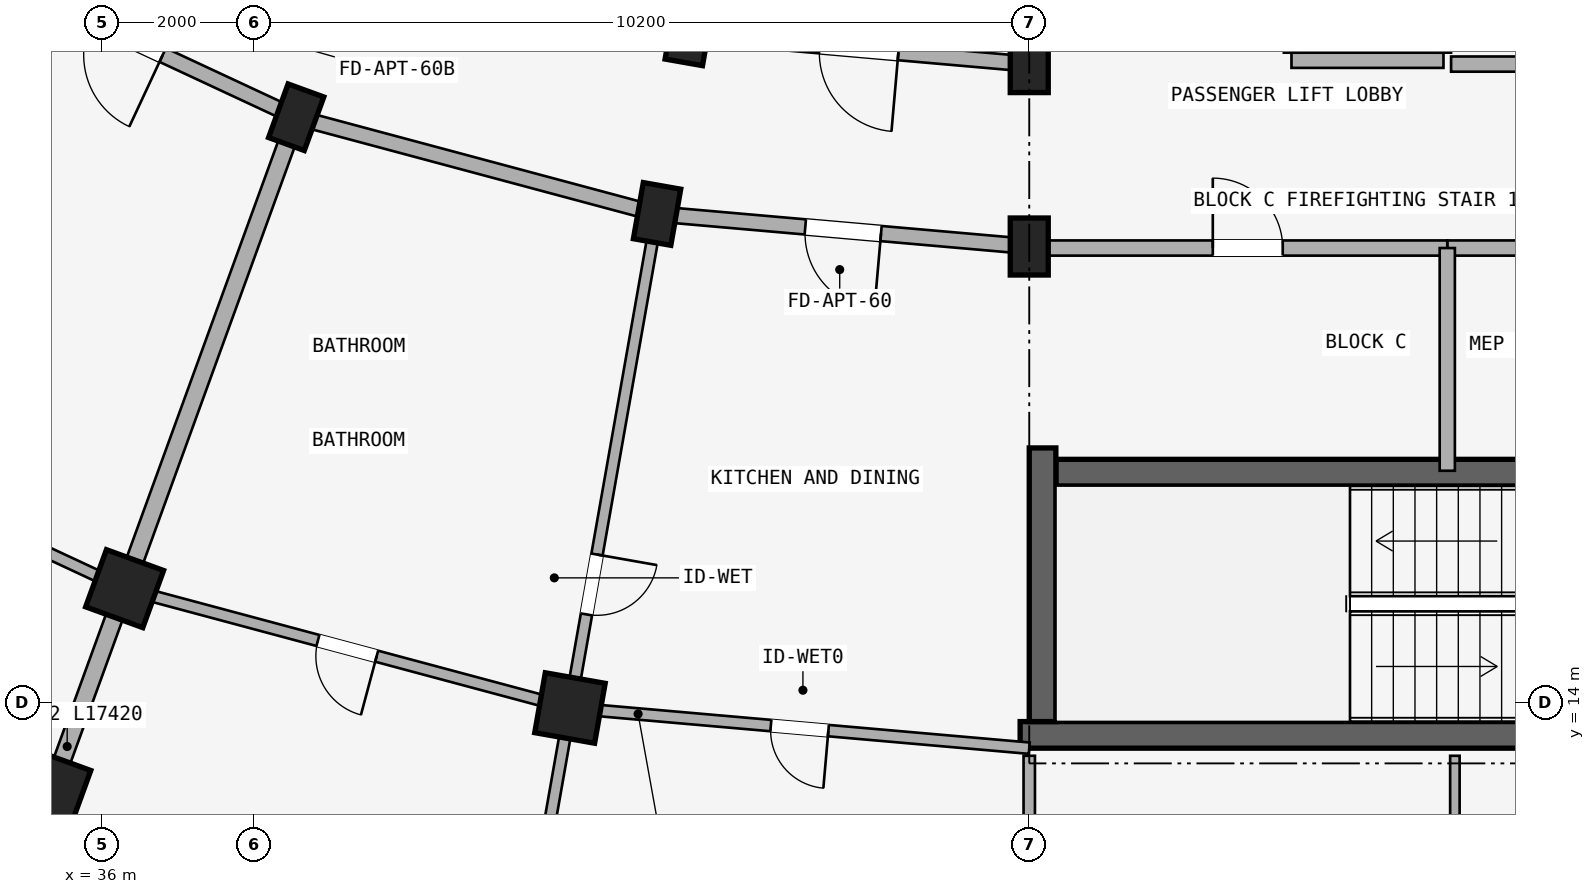
"""IFC4 building model, lengths in metres.
Left out: names, types, materials, properties, quantities, classifications, styles, units other than length and angle.
Written with IfcOpenShell. Run it as: python <this file> out.ifc"""

import sys

from ifc_helpers import new_model, si_unit, direction, frame, frame_2d, origin, origin_2d, place, context, subcontext, project, spatial, rectangle, extrude, element, fill, save


model = new_model("IFC4")
c1 = context("Model", 3, precision=1e-05, world=origin(), true_north=direction((0.0, 1.0)))
c2 = subcontext(c1, "Body", "Model", "MODEL_VIEW")
j1 = project(units=[si_unit("LENGTHUNIT", "METRE"), si_unit("PLANEANGLEUNIT", "RADIAN")], contexts=[c1])
p1 = place(None, origin())
s1 = spatial("IfcSite", under=j1, at=p1, CompositionType="ELEMENT")
p2 = place(p1, origin())
s2 = spatial("IfcBuilding", under=s1, at=p2, CompositionType="ELEMENT")
p3 = place(p2, frame((0.0, 0.0, 8.7)))
s3 = spatial("IfcBuildingStorey", under=s2, at=p3, CompositionType="ELEMENT", Elevation=8.7)
p4 = place(p3, frame((48.08, 13.575, 0.0), z_axis=(0.0, 0.0, 1.0), x_axis=(1.0, 0.0, 0.0)))
e1 = element("IfcWall", 1, at=p4, inside=s3, PredefinedType="SHEAR", context=c2, shape_type="SweptSolid", body=[
    extrude(rectangle(XDim=8.545, YDim=0.35, at=frame_2d((4.272, 0.0))), origin(), (0.0, 0.0, 1.0), 2.93),
])
p5 = place(p3, frame((48.55, 17.025, 0.0), z_axis=(0.0, 0.0, 1.0), x_axis=(1.0, 0.0, 0.0)))
e2 = element("IfcWall", 2, at=p5, inside=s3, PredefinedType="SHEAR", context=c2, shape_type="SweptSolid", body=[
    extrude(rectangle(XDim=8.075, YDim=0.35, at=frame_2d((4.038, 0.0))), origin(), (0.0, 0.0, 1.0), 2.93),
])
p6 = place(p5, frame((6.38, 0.0, 0.0)))
e3 = element("IfcOpeningElement", 3, at=p6, cuts=e2, PredefinedType="OPENING", context=c2, shape_type="SweptSolid", body=[
    extrude(rectangle(XDim=1.24, YDim=2.15, at=frame_2d((0.62, 1.075))), frame((0.0, 0.185, 0.0), z_axis=(0.0, -1.0, 0.0), x_axis=(1.0, 0.0, 0.0)), (0.0, 0.0, 1.0), 0.37),
])
p7 = place(p3, frame((48.375, 17.35, 0.0), z_axis=(0.0, 0.0, 1.0), x_axis=(0.0, -1.0, 0.0)))
e4 = element("IfcWall", 4, at=p7, inside=s3, PredefinedType="SHEAR", context=c2, shape_type="SweptSolid", body=[
    extrude(rectangle(XDim=3.6, YDim=0.35, at=frame_2d((1.8, 0.0))), origin(), (0.0, 0.0, 1.0), 2.93),
])
for number, where, z_axis, x_axis in (
    (5, (48.2, 22.4, 0.0), (0.0, 0.0, 1.0), (1.0, 0.0, 0.0)),
    (6, (48.2, 20.0, 0.0), (0.0, 0.0, 1.0), (1.0, 0.0, 0.0)),
    (7, (43.72, 22.792, 0.0), (0.0, 0.0, 1.0), (-0.985, 0.174, 0.0)),
    (8, (43.303, 20.428, 0.0), (0.0, 0.0, 1.0), (-0.985, 0.174, 0.0)),
):
    element("IfcColumn", number, at=place(p3, frame(where, z_axis=z_axis, x_axis=x_axis)), inside=s3, PredefinedType="COLUMN", context=c2, shape_type="SweptSolid", body=[
        extrude(rectangle(XDim=0.5, YDim=0.75, at=origin_2d()), origin(), (0.0, 0.0, 1.0), 2.93),
    ])
p8 = place(p3, frame((42.157, 13.929, 0.0), z_axis=(0.0, 0.0, 1.0), x_axis=(-0.984807753012, 0.173648177667, 0.0)))
e9 = element("IfcColumn", 9, at=p8, inside=s3, PredefinedType="COLUMN", context=c2, shape_type="SweptSolid", body=[
    extrude(rectangle(XDim=0.8, YDim=0.8, at=origin_2d()), origin(), (0.0, 0.0, 1.0), 2.93),
])
p9 = place(p3, frame((38.555, 21.701, 0.0), z_axis=(0.0, 0.0, 1.0), x_axis=(-0.939692620786, 0.342020143326, 0.0)))
e10 = element("IfcColumn", 10, at=p9, inside=s3, PredefinedType="COLUMN", context=c2, shape_type="SweptSolid", body=[
    extrude(rectangle(XDim=0.5, YDim=0.75, at=origin_2d()), origin(), (0.0, 0.0, 1.0), 2.93),
])
for number, where, z_axis, x_axis in (
    (11, (36.298, 15.499, 0.0), (0.0, 0.0, 1.0), (-0.94, 0.342, 0.0)),
    (12, (35.34, 12.868, 0.0), (0.0, 0.0, 1.0), (-0.94, 0.342, 0.0)),
):
    element("IfcColumn", number, at=place(p3, frame(where, z_axis=z_axis, x_axis=x_axis)), inside=s3, PredefinedType="COLUMN", context=c2, shape_type="SweptSolid", body=[
        extrude(rectangle(XDim=0.8, YDim=0.8, at=origin_2d()), origin(), (0.0, 0.0, 1.0), 2.93),
    ])
p10 = place(p3, frame((53.7, 19.98, 0.0), z_axis=(0.0, 0.0, 1.0), x_axis=(1.0, 0.0, 0.0)))
e13 = element("IfcWall", 13, at=p10, inside=s3, PredefinedType="STANDARD", context=c2, shape_type="SweptSolid", body=[
    extrude(rectangle(XDim=5.65, YDim=0.2, at=frame_2d((2.825, 0.0))), origin(), (0.0, 0.0, 1.0), 2.372),
])
p11 = place(p10, frame((1.923, 0.0, 0.0)))
e14 = element("IfcOpeningElement", 14, at=p11, cuts=e13, PredefinedType="OPENING", context=c2, shape_type="SweptSolid", body=[
    extrude(rectangle(XDim=1.24, YDim=2.15, at=frame_2d((0.62, 1.075))), frame((0.0, 0.11, 0.0), z_axis=(0.0, -1.0, 0.0), x_axis=(1.0, 0.0, 0.0)), (0.0, 0.0, 1.0), 0.22),
])
p12 = place(p3, frame((48.45, 19.98, 0.0), z_axis=(0.0, 0.0, 1.0), x_axis=(1.0, 0.0, 0.0)))
e15 = element("IfcWall", 15, at=p12, inside=s3, PredefinedType="STANDARD", context=c2, shape_type="SweptSolid", body=[
    extrude(rectangle(XDim=5.25, YDim=0.2, at=frame_2d((2.625, 0.0))), origin(), (0.0, 0.0, 1.0), 2.372),
])
p13 = place(p12, frame((2.165, 0.0, 0.0)))
e16 = element("IfcOpeningElement", 16, at=p13, cuts=e15, PredefinedType="OPENING", context=c2, shape_type="SweptSolid", body=[
    extrude(rectangle(XDim=0.92, YDim=2.1, at=frame_2d((0.46, 1.05))), frame((0.0, 0.11, 0.0), z_axis=(0.0, -1.0, 0.0), x_axis=(1.0, 0.0, 0.0)), (0.0, 0.0, 1.0), 0.22),
])
p14 = place(p3, frame((53.7, 19.98, 0.0), z_axis=(0.0, 0.0, 1.0), x_axis=(0.0, -1.0, 0.0)))
e17 = element("IfcWall", 17, at=p14, inside=s3, PredefinedType="STANDARD", context=c2, shape_type="SweptSolid", body=[
    extrude(rectangle(XDim=2.93, YDim=0.2, at=frame_2d((1.465, 0.0))), origin(), (0.0, 0.0, 1.0), 2.372),
])
p15 = place(p3, frame((51.65, 22.45, 0.0), z_axis=(0.0, 0.0, 1.0), x_axis=(1.0, 0.0, 0.0)))
e18 = element("IfcWall", 18, at=p15, inside=s3, PredefinedType="STANDARD", context=c2, shape_type="SweptSolid", body=[
    extrude(rectangle(XDim=2.0, YDim=0.2, at=frame_2d((1.0, 0.0))), origin(), (0.0, 0.0, 1.0), 2.372),
])
p16 = place(p3, frame((51.65, 25.15, 0.0), z_axis=(0.0, 0.0, 1.0), x_axis=(0.0, -1.0, 0.0)))
e19 = element("IfcWall", 19, at=p16, inside=s3, PredefinedType="STANDARD", context=c2, shape_type="SweptSolid", body=[
    extrude(rectangle(XDim=2.6, YDim=0.2, at=frame_2d((1.3, 0.0))), origin(), (0.0, 0.0, 1.0), 2.372),
])
p17 = place(p3, frame((53.65, 25.15, 0.0), z_axis=(0.0, 0.0, 1.0), x_axis=(0.0, -1.0, 0.0)))
e20 = element("IfcWall", 20, at=p17, inside=s3, PredefinedType="STANDARD", context=c2, shape_type="SweptSolid", body=[
    extrude(rectangle(XDim=2.6, YDim=0.2, at=frame_2d((1.3, 0.0))), origin(), (0.0, 0.0, 1.0), 2.372),
])
p18 = place(p17, frame((0.79, 0.0, 0.0)))
e21 = element("IfcOpeningElement", 21, at=p18, cuts=e20, PredefinedType="OPENING", context=c2, shape_type="SweptSolid", body=[
    extrude(rectangle(XDim=1.02, YDim=2.15, at=frame_2d((0.51, 1.075))), frame((0.0, 0.11, 0.0), z_axis=(0.0, -1.0, 0.0), x_axis=(1.0, 0.0, 0.0)), (0.0, 0.0, 1.0), 0.22),
])
p19 = place(p3, frame((53.75, 22.4, 0.0), z_axis=(0.0, 0.0, 1.0), x_axis=(1.0, 0.0, 0.0)))
e22 = element("IfcWall", 22, at=p19, inside=s3, PredefinedType="STANDARD", context=c2, shape_type="SweptSolid", body=[
    extrude(rectangle(XDim=5.6, YDim=0.2, at=frame_2d((2.8, 0.0))), origin(), (0.0, 0.0, 1.0), 2.372),
])
p20 = place(p19, frame((1.91, 0.0, 0.0)))
e23 = element("IfcOpeningElement", 23, at=p20, cuts=e22, PredefinedType="OPENING", context=c2, shape_type="SweptSolid", body=[
    extrude(rectangle(XDim=1.22, YDim=2.15, at=frame_2d((0.61, 1.075))), frame((0.0, 0.11, 0.0), z_axis=(0.0, -1.0, 0.0), x_axis=(1.0, 0.0, 0.0)), (0.0, 0.0, 1.0), 0.22),
])
p21 = place(p3, frame((53.8, 13.3, 0.0), z_axis=(0.0, 0.0, 1.0), x_axis=(0.0, -1.0, 0.0)))
e24 = element("IfcWall", 24, at=p21, inside=s3, PredefinedType="PARTITIONING", context=c2, shape_type="SweptSolid", body=[
    extrude(rectangle(XDim=10.82, YDim=0.125, at=frame_2d((5.41, 0.0))), origin(), (0.0, 0.0, 1.0), 2.372),
])
p22 = place(p21, frame((0.899, 0.0, 0.0)))
e25 = element("IfcOpeningElement", 25, at=p22, cuts=e24, PredefinedType="OPENING", context=c2, shape_type="SweptSolid", body=[
    extrude(rectangle(XDim=0.8, YDim=2.1, at=frame_2d((0.4, 1.05))), frame((0.0, 0.073, 0.0), z_axis=(0.0, -1.0, 0.0), x_axis=(1.0, 0.0, 0.0)), (0.0, 0.0, 1.0), 0.145),
])
p23 = place(p3, frame((48.2, 22.4, 0.0), z_axis=(0.0, 0.0, 1.0), x_axis=(-0.996191949488, 0.087187153726, 0.0)))
e26 = element("IfcWall", 26, at=p23, inside=s3, PredefinedType="STANDARD", context=c2, shape_type="SweptSolid", body=[
    extrude(rectangle(XDim=4.497, YDim=0.2, at=frame_2d((2.249, 0.0))), origin(), (0.0, 0.0, 1.0), 2.372),
])
p24 = place(p23, frame((1.729, 0.0, 0.0)))
e27 = element("IfcOpeningElement", 27, at=p24, cuts=e26, PredefinedType="OPENING", context=c2, shape_type="SweptSolid", body=[
    extrude(rectangle(XDim=1.04, YDim=2.15, at=frame_2d((0.52, 1.075))), frame((0.0, 0.11, 0.0), z_axis=(0.0, -1.0, 0.0), x_axis=(1.0, 0.0, 0.0)), (0.0, 0.0, 1.0), 0.22),
])
p25 = place(p3, frame((48.2, 20.0, 0.0), z_axis=(0.0, 0.0, 1.0), x_axis=(-0.996193663584, 0.087167566415, 0.0)))
e28 = element("IfcWall", 28, at=p25, inside=s3, PredefinedType="STANDARD", context=c2, shape_type="SweptSolid", body=[
    extrude(rectangle(XDim=4.916, YDim=0.2, at=frame_2d((2.458, 0.0))), origin(), (0.0, 0.0, 1.0), 2.372),
])
p26 = place(p25, frame((1.958, 0.0, 0.0)))
e29 = element("IfcOpeningElement", 29, at=p26, cuts=e28, PredefinedType="OPENING", context=c2, shape_type="SweptSolid", body=[
    extrude(rectangle(XDim=1.0, YDim=2.15, at=frame_2d((0.5, 1.075))), frame((0.0, 0.11, 0.0), z_axis=(0.0, -1.0, 0.0), x_axis=(1.0, 0.0, 0.0)), (0.0, 0.0, 1.0), 0.22),
])
p27 = place(p3, frame((43.303, 20.428, 0.0), z_axis=(0.0, 0.0, 1.0), x_axis=(-0.965930095386, 0.258803112091, 0.0)))
e30 = element("IfcWall", 30, at=p27, inside=s3, PredefinedType="STANDARD", context=c2, shape_type="SweptSolid", body=[
    extrude(rectangle(XDim=4.916, YDim=0.2, at=frame_2d((2.458, 0.0))), origin(), (0.0, 0.0, 1.0), 2.372),
])
p28 = place(p3, frame((38.555, 21.701, 0.0), z_axis=(0.0, 0.0, 1.0), x_axis=(-0.906302381024, 0.422629854778, 0.0)))
e31 = element("IfcWall", 31, at=p28, inside=s3, PredefinedType="STANDARD", context=c2, shape_type="SweptSolid", body=[
    extrude(rectangle(XDim=4.915, YDim=0.2, at=frame_2d((2.458, 0.0))), origin(), (0.0, 0.0, 1.0), 2.372),
])
p29 = place(p28, frame((1.938, 0.0, 0.0)))
e32 = element("IfcOpeningElement", 32, at=p29, cuts=e31, PredefinedType="OPENING", context=c2, shape_type="SweptSolid", body=[
    extrude(rectangle(XDim=1.04, YDim=2.15, at=frame_2d((0.52, 1.075))), frame((0.0, 0.11, 0.0), z_axis=(0.0, -1.0, 0.0), x_axis=(1.0, 0.0, 0.0)), (0.0, 0.0, 1.0), 0.22),
])
p30 = place(p3, frame((48.2, 25.65, 0.0), z_axis=(0.0, 0.0, 1.0), x_axis=(0.0, -1.0, 0.0)))
e33 = element("IfcWall", 33, at=p30, inside=s3, PredefinedType="STANDARD", context=c2, shape_type="SweptSolid", body=[
    extrude(rectangle(XDim=3.2, YDim=0.22, at=frame_2d((1.6, 0.0))), origin(), (0.0, 0.0, 1.0), 2.372),
])
p31 = place(p3, frame((48.2, 13.3, 0.0), z_axis=(0.0, 0.0, 1.0), x_axis=(0.0, -1.0, 0.0)))
e34 = element("IfcWall", 34, at=p31, inside=s3, PredefinedType="PARTITIONING", context=c2, shape_type="SweptSolid", body=[
    extrude(rectangle(XDim=10.82, YDim=0.15, at=frame_2d((5.41, 0.0))), origin(), (0.0, 0.0, 1.0), 2.372),
])
p32 = place(p31, frame((0.899, 0.0, 0.0)))
e35 = element("IfcOpeningElement", 35, at=p32, cuts=e34, PredefinedType="OPENING", context=c2, shape_type="SweptSolid", body=[
    extrude(rectangle(XDim=0.8, YDim=2.1, at=frame_2d((0.4, 1.05))), frame((0.0, 0.085, 0.0), z_axis=(0.0, -1.0, 0.0), x_axis=(1.0, 0.0, 0.0)), (0.0, 0.0, 1.0), 0.17),
])
p33 = place(p3, frame((43.286, 20.33, 0.0), z_axis=(0.0, 0.0, 1.0), x_axis=(-0.173646216546, -0.984808098809, 0.0)))
e36 = element("IfcWall", 36, at=p33, inside=s3, PredefinedType="PARTITIONING", context=c2, shape_type="SweptSolid", body=[
    extrude(rectangle(XDim=17.42, YDim=0.15, at=frame_2d((8.71, 0.0))), origin(), (0.0, 0.0, 1.0), 2.372),
])
p34 = place(p33, frame((4.45, 0.0, 0.0)))
e37 = element("IfcOpeningElement", 37, at=p34, cuts=e36, PredefinedType="OPENING", context=c2, shape_type="SweptSolid", body=[
    extrude(rectangle(XDim=0.8, YDim=2.1, at=frame_2d((0.4, 1.05))), frame((0.0, 0.085, 0.0), z_axis=(0.0, -1.0, 0.0), x_axis=(1.0, 0.0, 0.0)), (0.0, 0.0, 1.0), 0.17),
])
p35 = place(p3, frame((38.521, 21.607, 0.0), z_axis=(0.0, 0.0, 1.0), x_axis=(-0.342022120477, -0.939691901159, 0.0)))
e38 = element("IfcWall", 38, at=p35, inside=s3, PredefinedType="STANDARD", context=c2, shape_type="SweptSolid", body=[
    extrude(rectangle(XDim=17.42, YDim=0.23, at=frame_2d((8.71, 0.0))), origin(), (0.0, 0.0, 1.0), 2.372),
])
p36 = place(p3, frame((48.2, 13.4, 0.0), z_axis=(0.0, 0.0, 1.0), x_axis=(-0.996193018494, 0.087174938512, 0.0)))
e39 = element("IfcWall", 39, at=p36, inside=s3, PredefinedType="PLUMBINGWALL", context=c2, shape_type="SweptSolid", body=[
    extrude(rectangle(XDim=6.066, YDim=0.15, at=frame_2d((3.033, 0.0))), origin(), (0.0, 0.0, 1.0), 2.372),
])
p37 = place(p36, frame((2.653, 0.0, 0.0)))
e40 = element("IfcOpeningElement", 40, at=p37, cuts=e39, PredefinedType="OPENING", context=c2, shape_type="SweptSolid", body=[
    extrude(rectangle(XDim=0.76, YDim=2.05, at=frame_2d((0.38, 1.025))), frame((0.0, 0.085, 0.0), z_axis=(0.0, -1.0, 0.0), x_axis=(1.0, 0.0, 0.0)), (0.0, 0.0, 1.0), 0.17),
])
p38 = place(p3, frame((42.157, 13.929, 0.0), z_axis=(0.0, 0.0, 1.0), x_axis=(-0.965923618901, 0.258827283048, 0.0)))
e41 = element("IfcWall", 41, at=p38, inside=s3, PredefinedType="PLUMBINGWALL", context=c2, shape_type="SweptSolid", body=[
    extrude(rectangle(XDim=6.066, YDim=0.15, at=frame_2d((3.033, 0.0))), origin(), (0.0, 0.0, 1.0), 2.372),
])
p39 = place(p38, frame((2.633, 0.0, 0.0)))
e42 = element("IfcOpeningElement", 42, at=p39, cuts=e41, PredefinedType="OPENING", context=c2, shape_type="SweptSolid", body=[
    extrude(rectangle(XDim=0.8, YDim=2.1, at=frame_2d((0.4, 1.05))), frame((0.0, 0.085, 0.0), z_axis=(0.0, -1.0, 0.0), x_axis=(1.0, 0.0, 0.0)), (0.0, 0.0, 1.0), 0.17),
])
p40 = place(p3, frame((36.298, 15.499, 0.0), z_axis=(0.0, 0.0, 1.0), x_axis=(-0.906312656069, 0.42260781991, 0.0)))
e43 = element("IfcWall", 43, at=p40, inside=s3, PredefinedType="PLUMBINGWALL", context=c2, shape_type="SweptSolid", body=[
    extrude(rectangle(XDim=6.066, YDim=0.15, at=frame_2d((3.033, 0.0))), origin(), (0.0, 0.0, 1.0), 2.372),
])
p41 = place(p40, frame((2.613, 0.0, 0.0)))
e44 = element("IfcOpeningElement", 44, at=p41, cuts=e43, PredefinedType="OPENING", context=c2, shape_type="SweptSolid", body=[
    extrude(rectangle(XDim=0.84, YDim=2.1, at=frame_2d((0.42, 1.05))), frame((0.0, 0.085, 0.0), z_axis=(0.0, -1.0, 0.0), x_axis=(1.0, 0.0, 0.0)), (0.0, 0.0, 1.0), 0.17),
])
p42 = place(p13, frame((0.92, 0.0, 0.0), z_axis=(0.0, 0.0, 1.0), x_axis=(-1.0, 0.0, 0.0)))
e45 = element("IfcDoor", 45, at=p42, inside=s3, OperationType="SINGLE_SWING_RIGHT", PredefinedType="DOOR", context=c2, shape_type="SweptSolid", body=[
    extrude(rectangle(XDim=0.92, YDim=2.1, at=frame_2d((0.46, 1.05))), frame((0.0, 0.025, 0.0), z_axis=(0.0, -1.0, 0.0), x_axis=(1.0, 0.0, 0.0)), (0.0, 0.0, 1.0), 0.05),
])
fill(e16, e45)
p43 = place(p34, origin())
e46 = element("IfcDoor", 46, at=p43, inside=s3, OperationType="SINGLE_SWING_LEFT", PredefinedType="DOOR", context=c2, shape_type="SweptSolid", body=[
    extrude(rectangle(XDim=0.8, YDim=2.1, at=frame_2d((0.4, 1.05))), frame((0.0, 0.025, 0.0), z_axis=(0.0, -1.0, 0.0), x_axis=(1.0, 0.0, 0.0)), (0.0, 0.0, 1.0), 0.05),
])
fill(e37, e46)
p44 = place(p26, frame((1.0, 0.0, 0.0), z_axis=(0.0, 0.0, 1.0), x_axis=(-1.0, 0.0, 0.0)))
e47 = element("IfcDoor", 47, at=p44, inside=s3, OperationType="SINGLE_SWING_RIGHT", PredefinedType="DOOR", context=c2, shape_type="SweptSolid", body=[
    extrude(rectangle(XDim=1.0, YDim=2.15, at=frame_2d((0.5, 1.075))), frame((0.0, 0.025, 0.0), z_axis=(0.0, -1.0, 0.0), x_axis=(1.0, 0.0, 0.0)), (0.0, 0.0, 1.0), 0.05),
])
fill(e29, e47)
p45 = place(p37, origin())
e48 = element("IfcDoor", 48, at=p45, inside=s3, OperationType="SINGLE_SWING_LEFT", PredefinedType="DOOR", context=c2, shape_type="SweptSolid", body=[
    extrude(rectangle(XDim=0.76, YDim=2.05, at=frame_2d((0.38, 1.025))), frame((0.0, 0.025, 0.0), z_axis=(0.0, -1.0, 0.0), x_axis=(1.0, 0.0, 0.0)), (0.0, 0.0, 1.0), 0.05),
])
fill(e40, e48)
p46 = place(p39, frame((0.8, 0.0, 0.0), z_axis=(0.0, 0.0, 1.0), x_axis=(-1.0, 0.0, 0.0)))
e49 = element("IfcDoor", 49, at=p46, inside=s3, OperationType="SINGLE_SWING_RIGHT", PredefinedType="DOOR", context=c2, shape_type="SweptSolid", body=[
    extrude(rectangle(XDim=0.8, YDim=2.1, at=frame_2d((0.4, 1.05))), frame((0.0, 0.025, 0.0), z_axis=(0.0, -1.0, 0.0), x_axis=(1.0, 0.0, 0.0)), (0.0, 0.0, 1.0), 0.05),
])
fill(e42, e49)
p47 = place(p29, origin())
e50 = element("IfcDoor", 50, at=p47, inside=s3, OperationType="SINGLE_SWING_LEFT", PredefinedType="DOOR", context=c2, shape_type="SweptSolid", body=[
    extrude(rectangle(XDim=1.04, YDim=2.15, at=frame_2d((0.52, 1.075))), frame((0.0, 0.025, 0.0), z_axis=(0.0, -1.0, 0.0), x_axis=(1.0, 0.0, 0.0)), (0.0, 0.0, 1.0), 0.05),
])
fill(e32, e50)
p48 = place(p24, origin())
e51 = element("IfcDoor", 51, at=p48, inside=s3, OperationType="SINGLE_SWING_LEFT", PredefinedType="DOOR", context=c2, shape_type="SweptSolid", body=[
    extrude(rectangle(XDim=1.04, YDim=2.15, at=frame_2d((0.52, 1.075))), frame((0.0, 0.025, 0.0), z_axis=(0.0, -1.0, 0.0), x_axis=(1.0, 0.0, 0.0)), (0.0, 0.0, 1.0), 0.05),
])
fill(e27, e51)
save(model, sys.argv[1])
